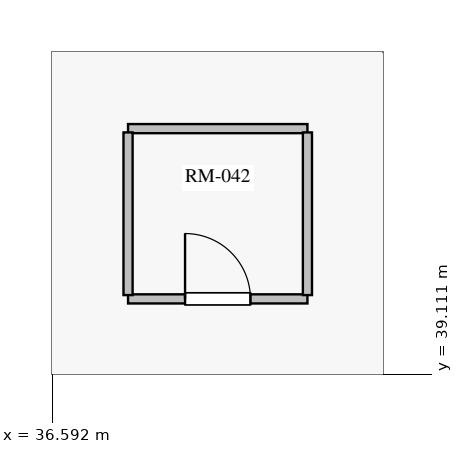
"""IFC4 building model, lengths in metres.
Left out: names, types, materials, properties, quantities, classifications, styles, units other than length and angle.
Written with IfcOpenShell. Run it as: python <this file> out.ifc"""

import sys

from ifc_helpers import new_model, si_unit, direction, frame, frame_2d, origin, origin_with_axes, place, context, subcontext, project, spatial, rectangle, extrude, source, transform, mapped, element, fill, save


model = new_model("IFC4")
c1 = context("Model", 3, precision=1e-05, world=origin(), true_north=direction((0.0, 1.0)))
c2 = subcontext(c1, "Body", "Model", "MODEL_VIEW")
j1 = project(units=[si_unit("LENGTHUNIT", "METRE"), si_unit("PLANEANGLEUNIT", "RADIAN")], contexts=[c1])
p1 = place(None, origin())
s1 = spatial("IfcSite", under=j1, at=p1, CompositionType="ELEMENT")
p2 = place(p1, origin())
s2 = spatial("IfcBuilding", under=s1, at=p2, CompositionType="ELEMENT")
p3 = place(p2, frame((0.0, 0.0, 216.9)))
s3 = spatial("IfcBuildingStorey", under=s2, at=p3, CompositionType="ELEMENT", Elevation=216.9)
p4 = place(p3, frame((45.374, 34.465, 0.0), z_axis=(0.0, 0.0, 1.0), x_axis=(-0.433079365024, 0.901355791899, 0.0)))
e1 = element("IfcWall", 1, at=p4, inside=s3, PredefinedType="SOLIDWALL", context=c2, shape_type="SweptSolid", body=[
    extrude(rectangle(XDim=12.874, YDim=0.28, at=frame_2d((6.437, 0.0))), origin(), (0.0, 0.0, 1.0), 2.85),
])
p5 = place(p4, frame((1.599, 0.0, 0.85)))
e2 = element("IfcOpeningElement", 2, at=p5, cuts=e1, PredefinedType="OPENING", context=c2, shape_type="SweptSolid", body=[
    extrude(rectangle(XDim=1.6, YDim=1.6, at=frame_2d((0.8, 0.8))), frame((0.0, 0.15, 0.0), z_axis=(0.0, -1.0, 0.0), x_axis=(1.0, 0.0, 0.0)), (0.0, 0.0, 1.0), 0.3),
])
p6 = place(p4, frame((5.637, 0.0, 0.85)))
e3 = element("IfcOpeningElement", 3, at=p6, cuts=e1, PredefinedType="OPENING", context=c2, shape_type="SweptSolid", body=[
    extrude(rectangle(XDim=1.6, YDim=1.6, at=frame_2d((0.8, 0.8))), frame((0.0, 0.15, 0.0), z_axis=(0.0, -1.0, 0.0), x_axis=(1.0, 0.0, 0.0)), (0.0, 0.0, 1.0), 0.3),
])
p7 = place(p4, frame((9.675, 0.0, 0.85)))
e4 = element("IfcOpeningElement", 4, at=p7, cuts=e1, PredefinedType="OPENING", context=c2, shape_type="SweptSolid", body=[
    extrude(rectangle(XDim=1.6, YDim=1.6, at=frame_2d((0.8, 0.8))), frame((0.0, 0.15, 0.0), z_axis=(0.0, -1.0, 0.0), x_axis=(1.0, 0.0, 0.0)), (0.0, 0.0, 1.0), 0.3),
])
p8 = place(p3, frame((37.587, 40.102, 0.0), z_axis=(0.0, 0.0, 1.0), x_axis=(1.0, 0.0, 0.0)))
e5 = element("IfcWall", 5, at=p8, inside=s3, PredefinedType="PARTITIONING", context=c2, shape_type="SweptSolid", body=[
    extrude(rectangle(XDim=2.36, YDim=0.12, at=frame_2d((1.18, 0.0))), origin(), (0.0, 0.0, 1.0), 2.85),
])
p9 = place(p8, frame((0.75, 0.0, 0.0)))
e6 = element("IfcOpeningElement", 6, at=p9, cuts=e5, PredefinedType="OPENING", context=c2, shape_type="SweptSolid", body=[
    extrude(rectangle(XDim=0.86, YDim=2.1, at=frame_2d((0.43, 1.05))), frame((0.0, 0.07, 0.0), z_axis=(0.0, -1.0, 0.0), x_axis=(1.0, 0.0, 0.0)), (0.0, 0.0, 1.0), 0.14),
])
p10 = place(p3, frame((39.947, 42.342, 0.0), z_axis=(0.0, 0.0, 1.0), x_axis=(-1.0, 0.0, 0.0)))
e7 = element("IfcWall", 7, at=p10, inside=s3, PredefinedType="PARTITIONING", context=c2, shape_type="SweptSolid", body=[
    extrude(rectangle(XDim=2.36, YDim=0.12, at=frame_2d((1.18, 0.0))), origin(), (0.0, 0.0, 1.0), 2.85),
])
for number, where, z_axis, x_axis in (
    (8, (39.947, 40.152, 0.0), (0.0, 0.0, 1.0), (0.0, 1.0, 0.0)),
    (9, (37.587, 42.292, 0.0), (0.0, 0.0, 1.0), (0.0, -1.0, 0.0)),
):
    element("IfcWall", number, at=place(p3, frame(where, z_axis=z_axis, x_axis=x_axis)), inside=s3, PredefinedType="PARTITIONING", context=c2, shape_type="SweptSolid", body=[
        extrude(rectangle(XDim=2.14, YDim=0.12, at=frame_2d((1.07, 0.0))), origin(), (0.0, 0.0, 1.0), 2.85),
    ])
m1 = source(origin_with_axes(), c2, "Body", "SweptSolid", [
    extrude(rectangle(XDim=1.6, YDim=1.6, at=frame_2d((0.8, 0.8))), frame((0.0, 0.03, 0.0), z_axis=(0.0, -1.0, 0.0), x_axis=(1.0, 0.0, 0.0)), (0.0, 0.0, 1.0), 0.06),
])
p11 = place(p7, origin())
e10 = element("IfcWindow", 10, at=p11, inside=s3, PartitioningType="SINGLE_PANEL", PredefinedType="WINDOW", context=c2, shape_type="MappedRepresentation", body=[
    mapped(m1, transform((0.0, 0.0, 0.0), scale=1.0)),
])
fill(e4, e10)
m2 = source(origin_with_axes(), c2, "Body", "SweptSolid", [
    extrude(rectangle(XDim=0.86, YDim=2.1, at=frame_2d((0.43, 1.05))), frame((0.0, 0.025, 0.0), z_axis=(0.0, -1.0, 0.0), x_axis=(1.0, 0.0, 0.0)), (0.0, 0.0, 1.0), 0.05),
])
p12 = place(p9, origin())
e11 = element("IfcDoor", 11, at=p12, inside=s3, OperationType="SINGLE_SWING_LEFT", PredefinedType="DOOR", context=c2, shape_type="MappedRepresentation", body=[
    mapped(m2, transform((0.0, 0.0, 0.0), scale=1.0)),
])
fill(e6, e11)
save(model, sys.argv[1])
